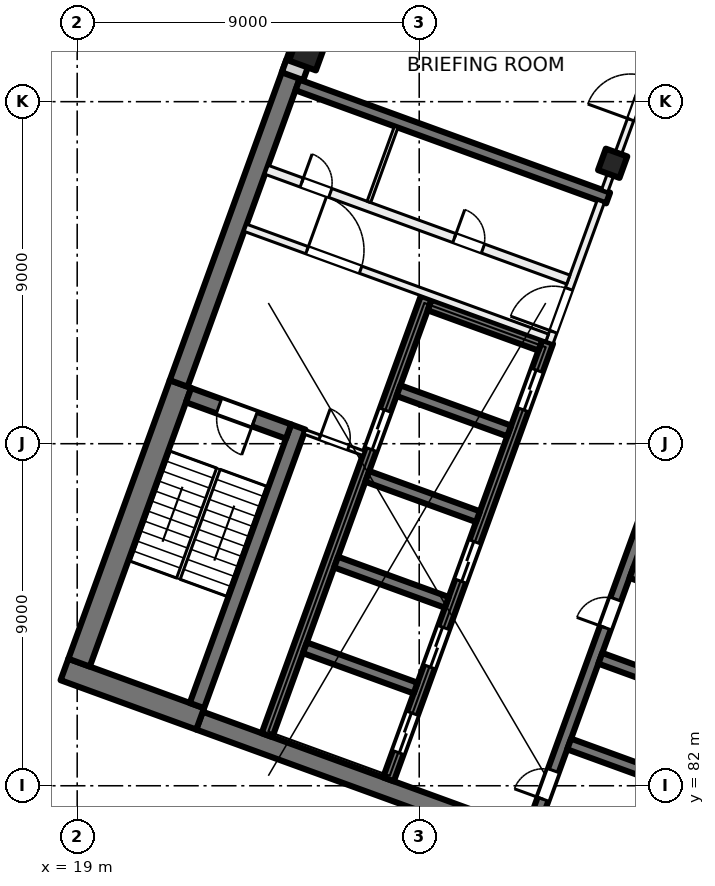
"""IFC4 building model, lengths in metres.
Left out: names, types, materials, properties, quantities, classifications, styles, units other than length and angle.
Written with IfcOpenShell. Run it as: python <this file> out.ifc"""

import sys

from ifc_helpers import new_model, si_unit, direction, frame, frame_2d, origin, origin_2d, place, context, subcontext, project, spatial, rectangle, extrude, element, fill, save


model = new_model("IFC4")
c1 = context("Model", 3, precision=1e-05, world=origin(), true_north=direction((0.0, 1.0)))
c2 = subcontext(c1, "Body", "Model", "MODEL_VIEW")
j1 = project(units=[si_unit("LENGTHUNIT", "METRE"), si_unit("PLANEANGLEUNIT", "RADIAN")], contexts=[c1])
p1 = place(None, origin())
s1 = spatial("IfcSite", under=j1, at=p1, CompositionType="ELEMENT")
p2 = place(p1, origin())
s2 = spatial("IfcBuilding", under=s1, at=p2, CompositionType="ELEMENT")
p3 = place(p2, frame((0.0, 0.0, 200.0)))
s3 = spatial("IfcBuildingStorey", under=s2, at=p3, CompositionType="ELEMENT", Elevation=200.0)
p4 = place(p3, frame((33.091, 98.379, 0.0), z_axis=(0.0, 0.0, 1.0), x_axis=(-0.342020143326, -0.939692620786, 0.0)))
e1 = element("IfcColumn", 1, at=p4, inside=s3, PredefinedType="COLUMN", context=c2, shape_type="SweptSolid", body=[
    extrude(rectangle(XDim=0.6, YDim=0.6, at=origin_2d()), origin(), (0.0, 0.0, 1.0), 4.0),
])
p5 = place(p3, frame((25.056, 101.303, 0.0), z_axis=(0.0, 0.0, 1.0), x_axis=(-0.342020143326, -0.939692620786, 0.0)))
e2 = element("IfcColumn", 2, at=p5, inside=s3, PredefinedType="COLUMN", context=c2, shape_type="SweptSolid", body=[
    extrude(rectangle(XDim=0.75, YDim=0.75, at=origin_2d()), origin(), (0.0, 0.0, 1.0), 4.0),
])
p6 = place(p3, frame((35.75, 78.788, 0.0), z_axis=(0.0, 0.0, 1.0), x_axis=(-0.939692894512, 0.342019391267, 0.0)))
e3 = element("IfcWall", 3, at=p6, inside=s3, PredefinedType="SHEAR", context=c2, shape_type="SweptSolid", body=[
    extrude(rectangle(XDim=14.4, YDim=0.5, at=frame_2d((7.2, 0.0))), origin(), (0.0, 0.0, 1.0), 4.0),
])
p7 = place(p3, frame((22.236, 83.76, 0.0), z_axis=(0.0, 0.0, 1.0), x_axis=(-0.939680822529, 0.342052557032, 0.0)))
e4 = element("IfcWall", 4, at=p7, inside=s3, PredefinedType="SHEAR", context=c2, shape_type="SweptSolid", body=[
    extrude(rectangle(XDim=3.8, YDim=0.6, at=frame_2d((1.9, 0.0))), origin(), (0.0, 0.0, 1.0), 4.0),
])
p8 = place(p3, frame((19.05, 85.239, 0.0), z_axis=(0.0, 0.0, 1.0), x_axis=(0.342016982193, 0.939693771338, 0.0)))
e5 = element("IfcWall", 5, at=p8, inside=s3, PredefinedType="SHEAR", context=c2, shape_type="SweptSolid", body=[
    extrude(rectangle(XDim=7.8, YDim=0.6, at=frame_2d((3.9, 0.0))), origin(), (0.0, 0.0, 1.0), 4.0),
])
p9 = place(p3, frame((21.67, 92.585, 0.0), z_axis=(0.0, 0.0, 1.0), x_axis=(0.342035714298, 0.93968695327, 0.0)))
e6 = element("IfcWall", 6, at=p9, inside=s3, PredefinedType="SHEAR", context=c2, shape_type="SweptSolid", body=[
    extrude(rectangle(XDim=8.975, YDim=0.5, at=frame_2d((4.488, 0.0))), origin(), (0.0, 0.0, 1.0), 4.0),
])
p10 = place(p3, frame((22.15, 84.11, 0.0), z_axis=(0.0, 0.0, 1.0), x_axis=(0.342016982193, 0.939693771338, 0.0)))
e7 = element("IfcWall", 7, at=p10, inside=s3, PredefinedType="SHEAR", context=c2, shape_type="SweptSolid", body=[
    extrude(rectangle(XDim=7.8, YDim=0.4, at=frame_2d((3.9, 0.0))), origin(), (0.0, 0.0, 1.0), 4.0),
])
p11 = place(p3, frame((24.562, 91.32, 0.0), z_axis=(0.0, 0.0, 1.0), x_axis=(-0.939717030584, 0.341953070509, 0.0)))
e8 = element("IfcWall", 8, at=p11, inside=s3, PredefinedType="SHEAR", context=c2, shape_type="SweptSolid", body=[
    extrude(rectangle(XDim=2.8, YDim=0.4, at=frame_2d((1.4, 0.0))), origin(), (0.0, 0.0, 1.0), 4.0),
])
p12 = place(p11, frame((0.95, 0.0, 0.0)))
e9 = element("IfcOpeningElement", 9, at=p12, cuts=e8, PredefinedType="OPENING", context=c2, shape_type="SweptSolid", body=[
    extrude(rectangle(XDim=1.0, YDim=2.1, at=frame_2d((0.5, 1.05))), frame((0.0, 0.21, 0.0), z_axis=(0.0, -1.0, 0.0), x_axis=(1.0, 0.0, 0.0)), (0.0, 0.0, 1.0), 0.42),
])
p13 = place(p3, frame((30.949, 80.801, 0.0), z_axis=(0.0, 0.0, 1.0), x_axis=(0.342016684409, 0.939693879721, 0.0)))
e10 = element("IfcWall", 10, at=p13, inside=s3, PredefinedType="SHEAR", context=c2, shape_type="SweptSolid", body=[
    extrude(rectangle(XDim=12.25, YDim=0.3, at=frame_2d((6.125, 0.0))), origin(), (0.0, 0.0, 1.0), 4.0),
])
p14 = place(p13, frame((0.9, 0.0, 0.0)))
e11 = element("IfcOpeningElement", 11, at=p14, cuts=e10, PredefinedType="OPENING", context=c2, shape_type="SweptSolid", body=[
    extrude(rectangle(XDim=0.8, YDim=2.1, at=frame_2d((0.4, 1.05))), frame((0.0, 0.16, 0.0), z_axis=(0.0, -1.0, 0.0), x_axis=(1.0, 0.0, 0.0)), (0.0, 0.0, 1.0), 0.32),
])
p15 = place(p13, frame((5.7, 0.0, 0.0)))
e12 = element("IfcOpeningElement", 12, at=p15, cuts=e10, PredefinedType="OPENING", context=c2, shape_type="SweptSolid", body=[
    extrude(rectangle(XDim=0.8, YDim=2.1, at=frame_2d((0.4, 1.05))), frame((0.0, 0.16, 0.0), z_axis=(0.0, -1.0, 0.0), x_axis=(1.0, 0.0, 0.0)), (0.0, 0.0, 1.0), 0.32),
])
p16 = place(p3, frame((34.858, 82.039, 0.0), z_axis=(0.0, 0.0, 1.0), x_axis=(-0.939689908313, 0.342027595692, 0.0)))
e13 = element("IfcWall", 13, at=p16, inside=s3, PredefinedType="SHEAR", context=c2, shape_type="SweptSolid", body=[
    extrude(rectangle(XDim=3.1, YDim=0.3, at=frame_2d((1.55, 0.0))), origin(), (0.0, 0.0, 1.0), 4.0),
])
p17 = place(p3, frame((35.679, 84.294, 0.0), z_axis=(0.0, 0.0, 1.0), x_axis=(-0.939706007505, 0.341983361377, 0.0)))
e14 = element("IfcWall", 14, at=p17, inside=s3, PredefinedType="SHEAR", context=c2, shape_type="SweptSolid", body=[
    extrude(rectangle(XDim=3.1, YDim=0.3, at=frame_2d((1.55, 0.0))), origin(), (0.0, 0.0, 1.0), 4.0),
])
p18 = place(p3, frame((36.5, 86.549, 0.0), z_axis=(0.0, 0.0, 1.0), x_axis=(-0.939689908313, 0.342027595692, 0.0)))
e15 = element("IfcWall", 15, at=p18, inside=s3, PredefinedType="SHEAR", context=c2, shape_type="SweptSolid", body=[
    extrude(rectangle(XDim=3.1, YDim=0.3, at=frame_2d((1.55, 0.0))), origin(), (0.0, 0.0, 1.0), 4.0),
])
p19 = place(p3, frame((27.191, 82.169, 0.0), z_axis=(0.0, 0.0, 1.0), x_axis=(0.342016684409, 0.939693879721, 0.0)))
e16 = element("IfcWall", 16, at=p19, inside=s3, PredefinedType="SHEAR", context=c2, shape_type="SweptSolid", body=[
    extrude(rectangle(XDim=12.25, YDim=0.3, at=frame_2d((6.125, 0.0))), origin(), (0.0, 0.0, 1.0), 4.0),
])
p20 = place(p19, frame((0.75, 0.0, 0.0)))
e17 = element("IfcOpeningElement", 17, at=p20, cuts=e16, PredefinedType="OPENING", context=c2, shape_type="SweptSolid", body=[
    extrude(rectangle(XDim=1.1, YDim=2.1, at=frame_2d((0.55, 1.05))), frame((0.0, 0.16, 0.0), z_axis=(0.0, -1.0, 0.0), x_axis=(1.0, 0.0, 0.0)), (0.0, 0.0, 1.0), 0.32),
])
p21 = place(p19, frame((3.15, 0.0, 0.0)))
e18 = element("IfcOpeningElement", 18, at=p21, cuts=e16, PredefinedType="OPENING", context=c2, shape_type="SweptSolid", body=[
    extrude(rectangle(XDim=1.1, YDim=2.1, at=frame_2d((0.55, 1.05))), frame((0.0, 0.16, 0.0), z_axis=(0.0, -1.0, 0.0), x_axis=(1.0, 0.0, 0.0)), (0.0, 0.0, 1.0), 0.32),
])
p22 = place(p19, frame((5.55, 0.0, 0.0)))
e19 = element("IfcOpeningElement", 19, at=p22, cuts=e16, PredefinedType="OPENING", context=c2, shape_type="SweptSolid", body=[
    extrude(rectangle(XDim=1.1, YDim=2.1, at=frame_2d((0.55, 1.05))), frame((0.0, 0.16, 0.0), z_axis=(0.0, -1.0, 0.0), x_axis=(1.0, 0.0, 0.0)), (0.0, 0.0, 1.0), 0.32),
])
p23 = place(p19, frame((10.35, 0.0, 0.0)))
e20 = element("IfcOpeningElement", 20, at=p23, cuts=e16, PredefinedType="OPENING", context=c2, shape_type="SweptSolid", body=[
    extrude(rectangle(XDim=1.1, YDim=2.1, at=frame_2d((0.55, 1.05))), frame((0.0, 0.16, 0.0), z_axis=(0.0, -1.0, 0.0), x_axis=(1.0, 0.0, 0.0)), (0.0, 0.0, 1.0), 0.32),
])
p24 = place(p3, frame((23.996, 83.332, 0.0), z_axis=(0.0, 0.0, 1.0), x_axis=(0.342016684409, 0.939693879721, 0.0)))
e21 = element("IfcWall", 21, at=p24, inside=s3, PredefinedType="SHEAR", context=c2, shape_type="SweptSolid", body=[
    extrude(rectangle(XDim=12.25, YDim=0.3, at=frame_2d((6.125, 0.0))), origin(), (0.0, 0.0, 1.0), 4.0),
])
p25 = place(p24, frame((8.0, 0.0, 0.0)))
e22 = element("IfcOpeningElement", 22, at=p25, cuts=e21, PredefinedType="OPENING", context=c2, shape_type="SweptSolid", body=[
    extrude(rectangle(XDim=1.1, YDim=2.1, at=frame_2d((0.55, 1.05))), frame((0.0, 0.16, 0.0), z_axis=(0.0, -1.0, 0.0), x_axis=(1.0, 0.0, 0.0)), (0.0, 0.0, 1.0), 0.32),
])
for number, where, z_axis, x_axis in (
    (23, (27.905, 84.57, 0.0), (0.0, 0.0, 1.0), (-0.94, 0.342, 0.0)),
    (24, (28.726, 86.825, 0.0), (0.0, 0.0, 1.0), (-0.94, 0.342, 0.0)),
    (25, (29.546, 89.08, 0.0), (0.0, 0.0, 1.0), (-0.94, 0.342, 0.0)),
):
    element("IfcWall", number, at=place(p3, frame(where, z_axis=z_axis, x_axis=x_axis)), inside=s3, PredefinedType="SHEAR", context=c2, shape_type="SweptSolid", body=[
        extrude(rectangle(XDim=3.1, YDim=0.3, at=frame_2d((1.55, 0.0))), origin(), (0.0, 0.0, 1.0), 4.0),
    ])
for number, where, z_axis, x_axis in (
    (26, (30.367, 91.336, 0.0), (0.0, 0.0, 1.0), (-0.94, 0.342, 0.0)),
    (27, (31.188, 93.591, 0.0), (0.0, 0.0, 1.0), (-0.94, 0.342, 0.0)),
):
    element("IfcWall", number, at=place(p3, frame(where, z_axis=z_axis, x_axis=x_axis)), inside=s3, PredefinedType="SHEAR", context=c2, shape_type="SweptSolid", body=[
        extrude(rectangle(XDim=3.1, YDim=0.3, at=frame_2d((1.55, 0.0))), origin(), (0.0, 0.0, 1.0), 4.0),
    ])
p26 = place(p3, frame((32.971, 97.465, 0.0), z_axis=(0.0, 0.0, 1.0), x_axis=(-0.939695066972, 0.34201342241, 0.0)))
e28 = element("IfcWall", 28, at=p26, inside=s3, PredefinedType="SHEAR", context=c2, shape_type="SweptSolid", body=[
    extrude(rectangle(XDim=8.7, YDim=0.3, at=frame_2d((4.35, 0.0))), origin(), (0.0, 0.0, 1.0), 4.0),
])
p27 = place(p3, frame((24.666, 100.669, 0.0), z_axis=(0.0, 0.0, 1.0), x_axis=(0.34201964167, 0.939692803373, 0.0)))
e29 = element("IfcWall", 29, at=p27, inside=s3, PredefinedType="SOLIDWALL", context=c2, shape_type="SweptSolid", body=[
    extrude(rectangle(XDim=32.884, YDim=0.6, at=frame_2d((16.442, 0.0))), origin(), (0.0, 0.0, 1.0), 3.625),
])
p28 = place(p27, frame((1.48, 0.0, 0.9)))
e30 = element("IfcOpeningElement", 30, at=p28, cuts=e29, PredefinedType="OPENING", context=c2, shape_type="SweptSolid", body=[
    extrude(rectangle(XDim=3.0, YDim=2.4, at=frame_2d((1.5, 1.2))), frame((0.0, 0.31, 0.0), z_axis=(0.0, -1.0, 0.0), x_axis=(1.0, 0.0, 0.0)), (0.0, 0.0, 1.0), 0.62),
])
p29 = place(p27, frame((5.98, 0.0, 0.9)))
e31 = element("IfcOpeningElement", 31, at=p29, cuts=e29, PredefinedType="OPENING", context=c2, shape_type="SweptSolid", body=[
    extrude(rectangle(XDim=3.0, YDim=2.4, at=frame_2d((1.5, 1.2))), frame((0.0, 0.31, 0.0), z_axis=(0.0, -1.0, 0.0), x_axis=(1.0, 0.0, 0.0)), (0.0, 0.0, 1.0), 0.62),
])
p30 = place(p27, frame((10.48, 0.0, 0.9)))
e32 = element("IfcOpeningElement", 32, at=p30, cuts=e29, PredefinedType="OPENING", context=c2, shape_type="SweptSolid", body=[
    extrude(rectangle(XDim=3.0, YDim=2.4, at=frame_2d((1.5, 1.2))), frame((0.0, 0.31, 0.0), z_axis=(0.0, -1.0, 0.0), x_axis=(1.0, 0.0, 0.0)), (0.0, 0.0, 1.0), 0.62),
])
p31 = place(p27, frame((14.98, 0.0, 0.9)))
e33 = element("IfcOpeningElement", 33, at=p31, cuts=e29, PredefinedType="OPENING", context=c2, shape_type="SweptSolid", body=[
    extrude(rectangle(XDim=3.0, YDim=2.4, at=frame_2d((1.5, 1.2))), frame((0.0, 0.31, 0.0), z_axis=(0.0, -1.0, 0.0), x_axis=(1.0, 0.0, 0.0)), (0.0, 0.0, 1.0), 0.62),
])
p32 = place(p27, frame((19.48, 0.0, 0.9)))
e34 = element("IfcOpeningElement", 34, at=p32, cuts=e29, PredefinedType="OPENING", context=c2, shape_type="SweptSolid", body=[
    extrude(rectangle(XDim=3.0, YDim=2.4, at=frame_2d((1.5, 1.2))), frame((0.0, 0.31, 0.0), z_axis=(0.0, -1.0, 0.0), x_axis=(1.0, 0.0, 0.0)), (0.0, 0.0, 1.0), 0.62),
])
p33 = place(p27, frame((23.98, 0.0, 0.9)))
e35 = element("IfcOpeningElement", 35, at=p33, cuts=e29, PredefinedType="OPENING", context=c2, shape_type="SweptSolid", body=[
    extrude(rectangle(XDim=3.0, YDim=2.4, at=frame_2d((1.5, 1.2))), frame((0.0, 0.31, 0.0), z_axis=(0.0, -1.0, 0.0), x_axis=(1.0, 0.0, 0.0)), (0.0, 0.0, 1.0), 0.62),
])
p34 = place(p27, frame((28.48, 0.0, 0.9)))
e36 = element("IfcOpeningElement", 36, at=p34, cuts=e29, PredefinedType="OPENING", context=c2, shape_type="SweptSolid", body=[
    extrude(rectangle(XDim=3.0, YDim=2.4, at=frame_2d((1.5, 1.2))), frame((0.0, 0.31, 0.0), z_axis=(0.0, -1.0, 0.0), x_axis=(1.0, 0.0, 0.0)), (0.0, 0.0, 1.0), 0.62),
])
p35 = place(p3, frame((31.427, 93.663, 0.0), z_axis=(0.0, 0.0, 1.0), x_axis=(0.342030870568, 0.93968871632, 0.0)))
e37 = element("IfcWall", 37, at=p35, inside=s3, PredefinedType="PARTITIONING", context=c2, shape_type="SweptSolid", body=[
    extrude(rectangle(XDim=3.95, YDim=0.2, at=frame_2d((1.975, 0.0))), origin(), (0.0, 0.0, 1.0), 3.625),
])
p36 = place(p35, frame((0.3, 0.0, 0.0)))
e38 = element("IfcOpeningElement", 38, at=p36, cuts=e37, PredefinedType="OPENING", context=c2, shape_type="SweptSolid", body=[
    extrude(rectangle(XDim=1.2, YDim=2.1, at=frame_2d((0.6, 1.05))), frame((0.0, 0.11, 0.0), z_axis=(0.0, -1.0, 0.0), x_axis=(1.0, 0.0, 0.0)), (0.0, 0.0, 1.0), 0.22),
])
p37 = place(p3, frame((23.427, 96.682, 0.0), z_axis=(0.0, 0.0, 1.0), x_axis=(0.939690465531, -0.342026064782, 0.0)))
e39 = element("IfcWall", 39, at=p37, inside=s3, PredefinedType="PARTITIONING", context=c2, shape_type="SweptSolid", body=[
    extrude(rectangle(XDim=8.45, YDim=0.2, at=frame_2d((4.225, 0.0))), origin(), (0.0, 0.0, 1.0), 3.625),
])
p38 = place(p37, frame((1.725, 0.0, 0.0)))
e40 = element("IfcOpeningElement", 40, at=p38, cuts=e39, PredefinedType="OPENING", context=c2, shape_type="SweptSolid", body=[
    extrude(rectangle(XDim=1.5, YDim=2.1, at=frame_2d((0.75, 1.05))), frame((0.0, 0.11, 0.0), z_axis=(0.0, -1.0, 0.0), x_axis=(1.0, 0.0, 0.0)), (0.0, 0.0, 1.0), 0.22),
])
p39 = place(p3, frame((23.983, 98.208, 0.0), z_axis=(0.0, 0.0, 1.0), x_axis=(0.939699751196, -0.342000552051, 0.0)))
e41 = element("IfcWall", 41, at=p39, inside=s3, PredefinedType="PARTITIONING", context=c2, shape_type="SweptSolid", body=[
    extrude(rectangle(XDim=8.45, YDim=0.25, at=frame_2d((4.225, 0.0))), origin(), (0.0, 0.0, 1.0), 3.625),
])
p40 = place(p39, frame((5.26, 0.0, 0.0)))
e42 = element("IfcOpeningElement", 42, at=p40, cuts=e41, PredefinedType="OPENING", context=c2, shape_type="SweptSolid", body=[
    extrude(rectangle(XDim=0.8, YDim=2.1, at=frame_2d((0.4, 1.05))), frame((0.0, 0.135, 0.0), z_axis=(0.0, -1.0, 0.0), x_axis=(1.0, 0.0, 0.0)), (0.0, 0.0, 1.0), 0.27),
])
p41 = place(p39, frame((0.985, 0.0, 0.0)))
e43 = element("IfcOpeningElement", 43, at=p41, cuts=e41, PredefinedType="OPENING", context=c2, shape_type="SweptSolid", body=[
    extrude(rectangle(XDim=0.8, YDim=2.1, at=frame_2d((0.4, 1.05))), frame((0.0, 0.135, 0.0), z_axis=(0.0, -1.0, 0.0), x_axis=(1.0, 0.0, 0.0)), (0.0, 0.0, 1.0), 0.27),
])
p42 = place(p3, frame((24.985, 91.312, 0.0), z_axis=(0.0, 0.0, 1.0), x_axis=(0.939719959755, -0.341945020783, 0.0)))
e44 = element("IfcWall", 44, at=p42, inside=s3, PredefinedType="PARTITIONING", context=c2, shape_type="SweptSolid", body=[
    extrude(rectangle(XDim=1.65, YDim=0.125, at=frame_2d((0.825, 0.0))), origin(), (0.0, 0.0, 1.0), 3.625),
])
p43 = place(p42, frame((0.425, 0.0, 0.0)))
e45 = element("IfcOpeningElement", 45, at=p43, cuts=e44, PredefinedType="OPENING", context=c2, shape_type="SweptSolid", body=[
    extrude(rectangle(XDim=0.8, YDim=2.1, at=frame_2d((0.4, 1.05))), frame((0.0, 0.073, 0.0), z_axis=(0.0, -1.0, 0.0), x_axis=(1.0, 0.0, 0.0)), (0.0, 0.0, 1.0), 0.145),
])
p44 = place(p3, frame((26.676, 97.362, 0.0), z_axis=(0.0, 0.0, 1.0), x_axis=(0.342023078919, 0.939691552312, 0.0)))
e46 = element("IfcWall", 46, at=p44, inside=s3, PredefinedType="PARTITIONING", context=c2, shape_type="SweptSolid", body=[
    extrude(rectangle(XDim=2.1, YDim=0.1, at=frame_2d((1.05, 0.0))), origin(), (0.0, 0.0, 1.0), 3.625),
])
p45 = place(p3, frame((32.881, 97.657, 0.0), z_axis=(0.0, 0.0, 1.0), x_axis=(0.342058204353, 0.939678766832, 0.0)))
e47 = element("IfcWall", 47, at=p45, inside=s3, PredefinedType="PARTITIONING", context=c2, shape_type="SweptSolid", body=[
    extrude(rectangle(XDim=5.163, YDim=0.175, at=frame_2d((2.581, 0.0))), origin(), (0.0, 0.0, 1.0), 3.625),
])
p46 = place(p45, frame((1.991, 0.0, 0.0)))
e48 = element("IfcOpeningElement", 48, at=p46, cuts=e47, PredefinedType="OPENING", context=c2, shape_type="SweptSolid", body=[
    extrude(rectangle(XDim=1.2, YDim=2.1, at=frame_2d((0.6, 1.05))), frame((0.0, 0.097, 0.0), z_axis=(0.0, -1.0, 0.0), x_axis=(1.0, 0.0, 0.0)), (0.0, 0.0, 1.0), 0.195),
])
p47 = place(p20, origin())
e49 = element("IfcDoor", 49, at=p47, inside=s3, OperationType="DOUBLE_DOOR_SLIDING", PredefinedType="DOOR", context=c2, shape_type="SweptSolid", body=[
    extrude(rectangle(XDim=1.1, YDim=2.1, at=frame_2d((0.55, 1.05))), frame((0.0, 0.025, 0.0), z_axis=(0.0, -1.0, 0.0), x_axis=(1.0, 0.0, 0.0)), (0.0, 0.0, 1.0), 0.05),
])
fill(e17, e49)
p48 = place(p21, origin())
e50 = element("IfcDoor", 50, at=p48, inside=s3, OperationType="DOUBLE_DOOR_SLIDING", PredefinedType="DOOR", context=c2, shape_type="SweptSolid", body=[
    extrude(rectangle(XDim=1.1, YDim=2.1, at=frame_2d((0.55, 1.05))), frame((0.0, 0.025, 0.0), z_axis=(0.0, -1.0, 0.0), x_axis=(1.0, 0.0, 0.0)), (0.0, 0.0, 1.0), 0.05),
])
fill(e18, e50)
p49 = place(p22, origin())
e51 = element("IfcDoor", 51, at=p49, inside=s3, OperationType="DOUBLE_DOOR_SLIDING", PredefinedType="DOOR", context=c2, shape_type="SweptSolid", body=[
    extrude(rectangle(XDim=1.1, YDim=2.1, at=frame_2d((0.55, 1.05))), frame((0.0, 0.025, 0.0), z_axis=(0.0, -1.0, 0.0), x_axis=(1.0, 0.0, 0.0)), (0.0, 0.0, 1.0), 0.05),
])
fill(e19, e51)
p50 = place(p23, origin())
e52 = element("IfcDoor", 52, at=p50, inside=s3, OperationType="DOUBLE_DOOR_SLIDING", PredefinedType="DOOR", context=c2, shape_type="SweptSolid", body=[
    extrude(rectangle(XDim=1.1, YDim=2.1, at=frame_2d((0.55, 1.05))), frame((0.0, 0.025, 0.0), z_axis=(0.0, -1.0, 0.0), x_axis=(1.0, 0.0, 0.0)), (0.0, 0.0, 1.0), 0.05),
])
fill(e20, e52)
p51 = place(p14, origin())
e53 = element("IfcDoor", 53, at=p51, inside=s3, OperationType="SINGLE_SWING_LEFT", PredefinedType="DOOR", context=c2, shape_type="SweptSolid", body=[
    extrude(rectangle(XDim=0.8, YDim=2.1, at=frame_2d((0.4, 1.05))), frame((0.0, 0.025, 0.0), z_axis=(0.0, -1.0, 0.0), x_axis=(1.0, 0.0, 0.0)), (0.0, 0.0, 1.0), 0.05),
])
fill(e11, e53)
p52 = place(p15, origin())
e54 = element("IfcDoor", 54, at=p52, inside=s3, OperationType="SINGLE_SWING_RIGHT", PredefinedType="DOOR", context=c2, shape_type="SweptSolid", body=[
    extrude(rectangle(XDim=0.8, YDim=2.1, at=frame_2d((0.4, 1.05))), frame((0.0, 0.025, 0.0), z_axis=(0.0, -1.0, 0.0), x_axis=(1.0, 0.0, 0.0)), (0.0, 0.0, 1.0), 0.05),
])
fill(e12, e54)
p53 = place(p36, origin())
e55 = element("IfcDoor", 55, at=p53, inside=s3, OperationType="DOUBLE_DOOR_SINGLE_SWING", PredefinedType="DOOR", context=c2, shape_type="SweptSolid", body=[
    extrude(rectangle(XDim=1.2, YDim=2.1, at=frame_2d((0.6, 1.05))), frame((0.0, 0.025, 0.0), z_axis=(0.0, -1.0, 0.0), x_axis=(1.0, 0.0, 0.0)), (0.0, 0.0, 1.0), 0.05),
])
fill(e38, e55)
p54 = place(p38, origin())
e56 = element("IfcDoor", 56, at=p54, inside=s3, OperationType="DOUBLE_DOOR_SINGLE_SWING", PredefinedType="DOOR", context=c2, shape_type="SweptSolid", body=[
    extrude(rectangle(XDim=1.5, YDim=2.1, at=frame_2d((0.75, 1.05))), frame((0.0, 0.025, 0.0), z_axis=(0.0, -1.0, 0.0), x_axis=(1.0, 0.0, 0.0)), (0.0, 0.0, 1.0), 0.05),
])
fill(e40, e56)
p55 = place(p12, origin())
e57 = element("IfcDoor", 57, at=p55, inside=s3, OperationType="SINGLE_SWING_LEFT", PredefinedType="DOOR", context=c2, shape_type="SweptSolid", body=[
    extrude(rectangle(XDim=1.0, YDim=2.1, at=frame_2d((0.5, 1.05))), frame((0.0, 0.025, 0.0), z_axis=(0.0, -1.0, 0.0), x_axis=(1.0, 0.0, 0.0)), (0.0, 0.0, 1.0), 0.05),
])
fill(e9, e57)
p56 = place(p43, origin())
e58 = element("IfcDoor", 58, at=p56, inside=s3, OperationType="SINGLE_SWING_RIGHT", PredefinedType="DOOR", context=c2, shape_type="SweptSolid", body=[
    extrude(rectangle(XDim=0.8, YDim=2.1, at=frame_2d((0.4, 1.05))), frame((0.0, 0.025, 0.0), z_axis=(0.0, -1.0, 0.0), x_axis=(1.0, 0.0, 0.0)), (0.0, 0.0, 1.0), 0.05),
])
fill(e45, e58)
p57 = place(p40, origin())
e59 = element("IfcDoor", 59, at=p57, inside=s3, OperationType="SINGLE_SWING_LEFT", PredefinedType="DOOR", context=c2, shape_type="SweptSolid", body=[
    extrude(rectangle(XDim=0.8, YDim=2.1, at=frame_2d((0.4, 1.05))), frame((0.0, 0.025, 0.0), z_axis=(0.0, -1.0, 0.0), x_axis=(1.0, 0.0, 0.0)), (0.0, 0.0, 1.0), 0.05),
])
fill(e42, e59)
p58 = place(p41, origin())
e60 = element("IfcDoor", 60, at=p58, inside=s3, OperationType="SINGLE_SWING_RIGHT", PredefinedType="DOOR", context=c2, shape_type="SweptSolid", body=[
    extrude(rectangle(XDim=0.8, YDim=2.1, at=frame_2d((0.4, 1.05))), frame((0.0, 0.025, 0.0), z_axis=(0.0, -1.0, 0.0), x_axis=(1.0, 0.0, 0.0)), (0.0, 0.0, 1.0), 0.05),
])
fill(e43, e60)
p59 = place(p25, origin())
e61 = element("IfcDoor", 61, at=p59, inside=s3, OperationType="DOUBLE_DOOR_SLIDING", PredefinedType="DOOR", context=c2, shape_type="SweptSolid", body=[
    extrude(rectangle(XDim=1.1, YDim=2.1, at=frame_2d((0.55, 1.05))), frame((0.0, 0.025, 0.0), z_axis=(0.0, -1.0, 0.0), x_axis=(1.0, 0.0, 0.0)), (0.0, 0.0, 1.0), 0.05),
])
fill(e22, e61)
p60 = place(p46, origin())
e62 = element("IfcDoor", 62, at=p60, inside=s3, OperationType="DOUBLE_DOOR_SINGLE_SWING", PredefinedType="DOOR", context=c2, shape_type="SweptSolid", body=[
    extrude(rectangle(XDim=1.2, YDim=2.1, at=frame_2d((0.6, 1.05))), frame((0.0, 0.025, 0.0), z_axis=(0.0, -1.0, 0.0), x_axis=(1.0, 0.0, 0.0)), (0.0, 0.0, 1.0), 0.05),
])
fill(e48, e62)
save(model, sys.argv[1])
